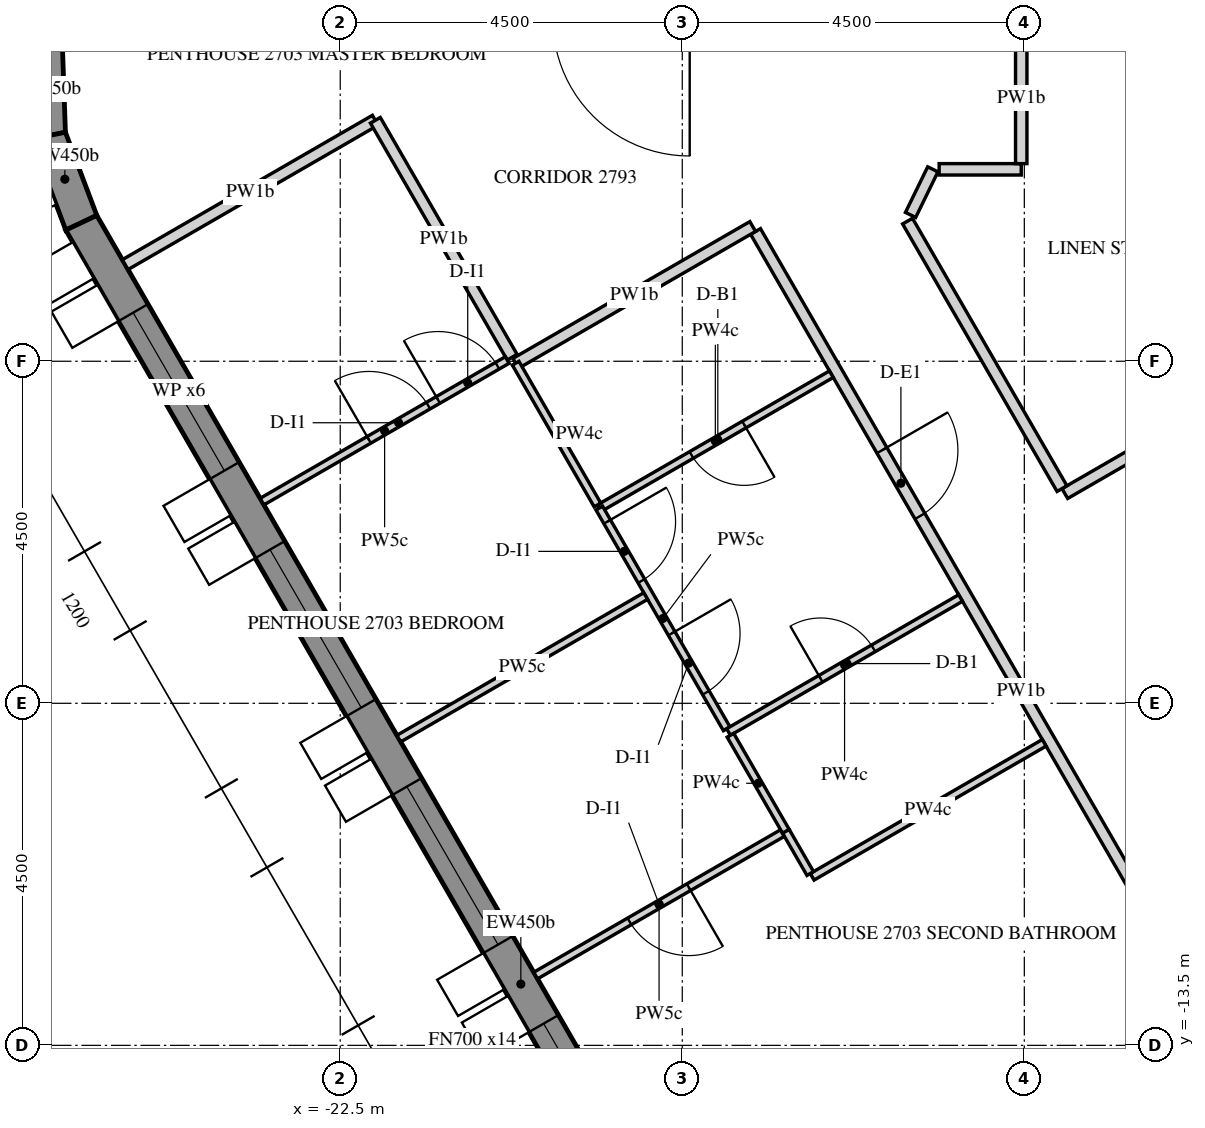
"""IFC4 building model, lengths in metres.
Left out: names, types, materials, properties, quantities, classifications, styles, units other than length and angle.
Written with IfcOpenShell. Run it as: python <this file> out.ifc"""

import sys

from ifc_helpers import new_model, si_unit, direction, frame, frame_2d, origin, place, context, subcontext, project, spatial, polyline, rectangle, outline, extrude, element, fill, save


model = new_model("IFC4")
c1 = context("Model", 3, precision=1e-05, world=origin(), true_north=direction((0.0, 1.0)))
c2 = subcontext(c1, "Body", "Model", "MODEL_VIEW")
j1 = project(units=[si_unit("LENGTHUNIT", "METRE"), si_unit("PLANEANGLEUNIT", "RADIAN")], contexts=[c1])
p1 = place(None, origin())
s1 = spatial("IfcSite", under=j1, at=p1, CompositionType="ELEMENT")
p2 = place(p1, origin())
s2 = spatial("IfcBuilding", under=s1, at=p2, CompositionType="ELEMENT")
p3 = place(p2, frame((0.0, 0.0, 349.5)))
s3 = spatial("IfcBuildingStorey", under=s2, at=p3, CompositionType="ELEMENT", Elevation=349.5)
p4 = place(p3, frame((-26.382, -0.309, 0.0), z_axis=(0.0, 0.0, 1.0), x_axis=(0.034887984255, -0.999391228976, 0.0)))
e1 = element("IfcWall", 1, at=p4, inside=s3, PredefinedType="SOLIDWALL", context=c2, shape_type="SweptSolid", body=[
    extrude(outline(polyline([(-0.037, -0.225), (1.261, -0.225), (1.188, 0.225), (0.037, 0.225), (-0.037, -0.225)])), origin(), (0.0, 0.0, 1.0), 3.75),
])
p5 = place(p3, frame((-26.339, -1.532, 0.0), z_axis=(0.0, 0.0, 1.0), x_axis=(0.353132996235, -0.935573132882, 0.0)))
e2 = element("IfcWall", 2, at=p5, inside=s3, PredefinedType="SOLIDWALL", context=c2, shape_type="SweptSolid", body=[
    extrude(outline(polyline([(-0.037, -0.225), (1.243, -0.225), (1.206, 0.225), (0.037, 0.225), (-0.037, -0.225)])), origin(), (0.0, 0.0, 1.0), 3.75),
])
p6 = place(p3, frame((-25.907, -2.678, 0.0), z_axis=(0.0, 0.0, 1.0), x_axis=(0.499997453958, -0.866026873738, 0.0)))
e3 = element("IfcWall", 3, at=p6, inside=s3, PredefinedType="SOLIDWALL", context=c2, shape_type="SweptSolid", body=[
    extrude(outline(polyline([(-0.018, -0.225), (23.152, -0.225), (23.11, 0.225), (0.018, 0.225), (-0.018, -0.225)])), origin(), (0.0, 0.0, 1.0), 3.75),
])
p7 = place(p6, frame((1.366, 0.0, 0.3)))
e4 = element("IfcOpeningElement", 4, at=p7, cuts=e3, PredefinedType="OPENING", context=c2, shape_type="SweptSolid", body=[
    extrude(rectangle(XDim=2.4, YDim=3.0, at=frame_2d((1.2, 1.5))), frame((0.0, 0.235, 0.0), z_axis=(0.0, -1.0, 0.0), x_axis=(1.0, 0.0, 0.0)), (0.0, 0.0, 1.0), 0.47),
])
p8 = place(p6, frame((4.966, 0.0, 0.3)))
e5 = element("IfcOpeningElement", 5, at=p8, cuts=e3, PredefinedType="OPENING", context=c2, shape_type="SweptSolid", body=[
    extrude(rectangle(XDim=2.4, YDim=3.0, at=frame_2d((1.2, 1.5))), frame((0.0, 0.235, 0.0), z_axis=(0.0, -1.0, 0.0), x_axis=(1.0, 0.0, 0.0)), (0.0, 0.0, 1.0), 0.47),
])
p9 = place(p6, frame((8.566, 0.0, 0.3)))
e6 = element("IfcOpeningElement", 6, at=p9, cuts=e3, PredefinedType="OPENING", context=c2, shape_type="SweptSolid", body=[
    extrude(rectangle(XDim=2.4, YDim=3.0, at=frame_2d((1.2, 1.5))), frame((0.0, 0.235, 0.0), z_axis=(0.0, -1.0, 0.0), x_axis=(1.0, 0.0, 0.0)), (0.0, 0.0, 1.0), 0.47),
])
p10 = place(p6, frame((12.166, 0.0, 0.3)))
e7 = element("IfcOpeningElement", 7, at=p10, cuts=e3, PredefinedType="OPENING", context=c2, shape_type="SweptSolid", body=[
    extrude(rectangle(XDim=2.4, YDim=3.0, at=frame_2d((1.2, 1.5))), frame((0.0, 0.235, 0.0), z_axis=(0.0, -1.0, 0.0), x_axis=(1.0, 0.0, 0.0)), (0.0, 0.0, 1.0), 0.47),
])
p11 = place(p6, frame((15.766, 0.0, 0.3)))
e8 = element("IfcOpeningElement", 8, at=p11, cuts=e3, PredefinedType="OPENING", context=c2, shape_type="SweptSolid", body=[
    extrude(rectangle(XDim=2.4, YDim=3.0, at=frame_2d((1.2, 1.5))), frame((0.0, 0.235, 0.0), z_axis=(0.0, -1.0, 0.0), x_axis=(1.0, 0.0, 0.0)), (0.0, 0.0, 1.0), 0.47),
])
p12 = place(p6, frame((19.366, 0.0, 0.3)))
e9 = element("IfcOpeningElement", 9, at=p12, cuts=e3, PredefinedType="OPENING", context=c2, shape_type="SweptSolid", body=[
    extrude(rectangle(XDim=2.4, YDim=3.0, at=frame_2d((1.2, 1.5))), frame((0.0, 0.235, 0.0), z_axis=(0.0, -1.0, 0.0), x_axis=(1.0, 0.0, 0.0)), (0.0, 0.0, 1.0), 0.47),
])
p13 = place(p3, frame((-17.036, -2.792, 0.0), z_axis=(0.0, 0.0, 1.0), x_axis=(0.500006428338, -0.86602169235, 0.0)))
e10 = element("IfcWall", 10, at=p13, inside=s3, PredefinedType="PARTITIONING", context=c2, shape_type="SweptSolid", body=[
    extrude(rectangle(XDim=13.966, YDim=0.15, at=frame_2d((6.983, 0.0))), origin(), (0.0, 0.0, 1.0), 2.82),
])
p14 = place(p13, frame((3.325, 0.0, 0.0)))
e11 = element("IfcOpeningElement", 11, at=p14, cuts=e10, PredefinedType="OPENING", context=c2, shape_type="SweptSolid", body=[
    extrude(rectangle(XDim=1.0, YDim=2.1, at=frame_2d((0.5, 1.05))), frame((0.0, 0.085, 0.0), z_axis=(0.0, -1.0, 0.0), x_axis=(1.0, 0.0, 0.0)), (0.0, 0.0, 1.0), 0.17),
])
p15 = place(p3, frame((-20.191, -4.528, 0.0), z_axis=(0.0, 0.0, 1.0), x_axis=(0.866018442252, 0.500012057535, 0.0)))
e12 = element("IfcWall", 12, at=p15, inside=s3, PredefinedType="PARTITIONING", context=c2, shape_type="SweptSolid", body=[
    extrude(rectangle(XDim=3.6, YDim=0.15, at=frame_2d((1.8, 0.0))), origin(), (0.0, 0.0, 1.0), 2.82),
])
p16 = place(p3, frame((-25.329, -3.229, 0.0), z_axis=(0.0, 0.0, 1.0), x_axis=(0.866019695343, 0.500009887181, 0.0)))
e13 = element("IfcWall", 13, at=p16, inside=s3, PredefinedType="PARTITIONING", context=c2, shape_type="SweptSolid", body=[
    extrude(rectangle(XDim=3.799, YDim=0.15, at=frame_2d((1.899, 0.0))), origin(), (0.0, 0.0, 1.0), 2.82),
])
p17 = place(p3, frame((-22.038, -1.33, 0.0), z_axis=(0.0, 0.0, 1.0), x_axis=(0.499976924066, -0.866038726271, 0.0)))
e14 = element("IfcWall", 14, at=p17, inside=s3, PredefinedType="PARTITIONING", context=c2, shape_type="SweptSolid", body=[
    extrude(rectangle(XDim=3.599, YDim=0.15, at=frame_2d((1.799, 0.0))), origin(), (0.0, 0.0, 1.0), 2.82),
])
p18 = place(p3, frame((-9.2, -4.066, 0.0), z_axis=(0.0, 0.0, 1.0), x_axis=(-0.866013608182, -0.500020430026, 0.0)))
e15 = element("IfcWall", 15, at=p18, inside=s3, PredefinedType="PARTITIONING", context=c2, shape_type="SweptSolid", body=[
    extrude(rectangle(XDim=4.35, YDim=0.15, at=frame_2d((2.175, 0.0))), origin(), (0.0, 0.0, 1.0), 2.82),
])
p19 = place(p18, frame((1.725, 0.0, 0.0)))
e16 = element("IfcOpeningElement", 16, at=p19, cuts=e15, PredefinedType="OPENING", context=c2, shape_type="SweptSolid", body=[
    extrude(rectangle(XDim=0.9, YDim=2.1, at=frame_2d((0.45, 1.05))), frame((0.0, 0.085, 0.0), z_axis=(0.0, -1.0, 0.0), x_axis=(1.0, 0.0, 0.0)), (0.0, 0.0, 1.0), 0.17),
])
p20 = place(p3, frame((-13.004, -6.176, 0.0), z_axis=(0.0, 0.0, 1.0), x_axis=(-0.500022342669, 0.866012503854, 0.0)))
e17 = element("IfcWall", 17, at=p20, inside=s3, PredefinedType="PARTITIONING", context=c2, shape_type="SweptSolid", body=[
    extrude(rectangle(XDim=4.064, YDim=0.15, at=frame_2d((2.032, 0.0))), origin(), (0.0, 0.0, 1.0), 2.82),
])
p21 = place(p3, frame((-14.997, -2.575, 0.0), z_axis=(0.0, 0.0, 1.0), x_axis=(0.438416427913, 0.898771959808, 0.0)))
e18 = element("IfcWall", 18, at=p21, inside=s3, PredefinedType="PARTITIONING", context=c2, shape_type="SweptSolid", body=[
    extrude(rectangle(XDim=0.668, YDim=0.15, at=frame_2d((0.334, 0.0))), origin(), (0.0, 0.0, 1.0), 2.82),
])
p22 = place(p3, frame((-14.62, -1.975, 0.0), z_axis=(0.0, 0.0, 1.0), x_axis=(1.0, 0.0, 0.0)))
e19 = element("IfcWall", 19, at=p22, inside=s3, PredefinedType="PARTITIONING", context=c2, shape_type="SweptSolid", body=[
    extrude(rectangle(XDim=1.08, YDim=0.15, at=frame_2d((0.54, 0.0))), origin(), (0.0, 0.0, 1.0), 2.82),
])
p23 = place(p3, frame((-13.541, -1.9, 0.0), z_axis=(0.0, 0.0, 1.0), x_axis=(0.0, 1.0, 0.0)))
e20 = element("IfcWall", 20, at=p23, inside=s3, PredefinedType="PARTITIONING", context=c2, shape_type="SweptSolid", body=[
    extrude(rectangle(XDim=1.725, YDim=0.15, at=frame_2d((0.862, 0.0))), origin(), (0.0, 0.0, 1.0), 2.82),
])
p24 = place(p3, frame((-16.681, -10.707, 0.0), z_axis=(0.0, 0.0, 1.0), x_axis=(-0.866039234136, -0.499976044363, 0.0)))
e21 = element("IfcWall", 21, at=p24, inside=s3, PredefinedType="PARTITIONING", context=c2, shape_type="SweptSolid", body=[
    extrude(rectangle(XDim=3.75, YDim=0.1, at=frame_2d((1.875, 0.0))), origin(), (0.0, 0.0, 1.0), 2.82),
])
p25 = place(p24, frame((1.425, 0.0, 0.0)))
e22 = element("IfcOpeningElement", 22, at=p25, cuts=e21, PredefinedType="OPENING", context=c2, shape_type="SweptSolid", body=[
    extrude(rectangle(XDim=0.9, YDim=2.1, at=frame_2d((0.45, 1.05))), frame((0.0, 0.06, 0.0), z_axis=(0.0, -1.0, 0.0), x_axis=(1.0, 0.0, 0.0)), (0.0, 0.0, 1.0), 0.12),
])
p26 = place(p3, frame((-13.239, -9.52, 0.0), z_axis=(0.0, 0.0, 1.0), x_axis=(-0.866031034943, -0.499990246421, 0.0)))
e23 = element("IfcWall", 23, at=p26, inside=s3, PredefinedType="PARTITIONING", context=c2, shape_type="SweptSolid", body=[
    extrude(rectangle(XDim=3.525, YDim=0.1, at=frame_2d((1.762, 0.0))), origin(), (0.0, 0.0, 1.0), 2.82),
])
p27 = place(p3, frame((-16.316, -11.239, 0.0), z_axis=(0.0, 0.0, 1.0), x_axis=(-0.499962526042, 0.866047038303, 0.0)))
e24 = element("IfcWall", 24, at=p27, inside=s3, PredefinedType="PARTITIONING", context=c2, shape_type="SweptSolid", body=[
    extrude(rectangle(XDim=0.646, YDim=0.1, at=frame_2d((0.323, 0.0))), origin(), (0.0, 0.0, 1.0), 2.82),
])
p28 = place(p3, frame((-16.039, -4.67, 0.0), z_axis=(0.0, 0.0, 1.0), x_axis=(-0.866031034943, -0.499990246421, 0.0)))
e25 = element("IfcWall", 25, at=p28, inside=s3, PredefinedType="PARTITIONING", context=c2, shape_type="SweptSolid", body=[
    extrude(rectangle(XDim=3.525, YDim=0.1, at=frame_2d((1.762, 0.0))), origin(), (0.0, 0.0, 1.0), 2.82),
])
p29 = place(p28, frame((1.325, 0.0, 0.0)))
e26 = element("IfcOpeningElement", 26, at=p29, cuts=e25, PredefinedType="OPENING", context=c2, shape_type="SweptSolid", body=[
    extrude(rectangle(XDim=0.8, YDim=2.1, at=frame_2d((0.4, 1.05))), frame((0.0, 0.06, 0.0), z_axis=(0.0, -1.0, 0.0), x_axis=(1.0, 0.0, 0.0)), (0.0, 0.0, 1.0), 0.12),
])
p30 = place(p3, frame((-19.092, -6.431, 0.0), z_axis=(0.0, 0.0, 1.0), x_axis=(0.500014404596, -0.866017087127, 0.0)))
e27 = element("IfcWall", 27, at=p30, inside=s3, PredefinedType="PARTITIONING", context=c2, shape_type="SweptSolid", body=[
    extrude(rectangle(XDim=3.354, YDim=0.1, at=frame_2d((1.677, 0.0))), origin(), (0.0, 0.0, 1.0), 2.82),
])
p31 = place(p30, frame((0.208, 0.0, 0.0)))
e28 = element("IfcOpeningElement", 28, at=p31, cuts=e27, PredefinedType="OPENING", context=c2, shape_type="SweptSolid", body=[
    extrude(rectangle(XDim=0.9, YDim=2.1, at=frame_2d((0.45, 1.05))), frame((0.0, 0.06, 0.0), z_axis=(0.0, -1.0, 0.0), x_axis=(1.0, 0.0, 0.0)), (0.0, 0.0, 1.0), 0.12),
])
p32 = place(p30, frame((1.905, 0.0, 0.0)))
e29 = element("IfcOpeningElement", 29, at=p32, cuts=e27, PredefinedType="OPENING", context=c2, shape_type="SweptSolid", body=[
    extrude(rectangle(XDim=0.9, YDim=2.1, at=frame_2d((0.45, 1.05))), frame((0.0, 0.06, 0.0), z_axis=(0.0, -1.0, 0.0), x_axis=(1.0, 0.0, 0.0)), (0.0, 0.0, 1.0), 0.12),
])
p33 = place(p3, frame((-17.391, -9.377, 0.0), z_axis=(0.0, 0.0, 1.0), x_axis=(0.866001044215, 0.500042189638, 0.0)))
e30 = element("IfcWall", 30, at=p33, inside=s3, PredefinedType="PARTITIONING", context=c2, shape_type="SweptSolid", body=[
    extrude(rectangle(XDim=3.525, YDim=0.1, at=frame_2d((1.763, 0.0))), origin(), (0.0, 0.0, 1.0), 2.82),
])
p34 = place(p33, frame((1.4, 0.0, 0.0)))
e31 = element("IfcOpeningElement", 31, at=p34, cuts=e30, PredefinedType="OPENING", context=c2, shape_type="SweptSolid", body=[
    extrude(rectangle(XDim=0.8, YDim=2.1, at=frame_2d((0.4, 1.05))), frame((0.0, 0.06, 0.0), z_axis=(0.0, -1.0, 0.0), x_axis=(1.0, 0.0, 0.0)), (0.0, 0.0, 1.0), 0.12),
])
p35 = place(p3, frame((-20.192, -4.526, 0.0), z_axis=(0.0, 0.0, 1.0), x_axis=(0.500039660922, -0.86600250433, 0.0)))
e32 = element("IfcWall", 32, at=p35, inside=s3, PredefinedType="PARTITIONING", context=c2, shape_type="SweptSolid", body=[
    extrude(rectangle(XDim=2.154, YDim=0.1, at=frame_2d((1.077, 0.0))), origin(), (0.0, 0.0, 1.0), 2.82),
])
p36 = place(p3, frame((-23.529, -6.346, 0.0), z_axis=(0.0, 0.0, 1.0), x_axis=(0.866012039196, 0.500023147432, 0.0)))
e33 = element("IfcWall", 33, at=p36, inside=s3, PredefinedType="PARTITIONING", context=c2, shape_type="SweptSolid", body=[
    extrude(rectangle(XDim=3.725, YDim=0.1, at=frame_2d((1.862, 0.0))), origin(), (0.0, 0.0, 1.0), 2.82),
])
p37 = place(p36, frame((2.675, 0.0, 0.0)))
e34 = element("IfcOpeningElement", 34, at=p37, cuts=e33, PredefinedType="OPENING", context=c2, shape_type="SweptSolid", body=[
    extrude(rectangle(XDim=0.9, YDim=2.1, at=frame_2d((0.45, 1.05))), frame((0.0, 0.06, 0.0), z_axis=(0.0, -1.0, 0.0), x_axis=(1.0, 0.0, 0.0)), (0.0, 0.0, 1.0), 0.12),
])
p38 = place(p36, frame((1.625, 0.0, 0.0)))
e35 = element("IfcOpeningElement", 35, at=p38, cuts=e33, PredefinedType="OPENING", context=c2, shape_type="SweptSolid", body=[
    extrude(rectangle(XDim=0.9, YDim=2.1, at=frame_2d((0.45, 1.05))), frame((0.0, 0.06, 0.0), z_axis=(0.0, -1.0, 0.0), x_axis=(1.0, 0.0, 0.0)), (0.0, 0.0, 1.0), 0.12),
])
p39 = place(p3, frame((-21.729, -9.464, 0.0), z_axis=(0.0, 0.0, 1.0), x_axis=(0.866022959057, 0.500004234368, 0.0)))
e36 = element("IfcWall", 36, at=p39, inside=s3, PredefinedType="PARTITIONING", context=c2, shape_type="SweptSolid", body=[
    extrude(rectangle(XDim=3.75, YDim=0.1, at=frame_2d((1.875, 0.0))), origin(), (0.0, 0.0, 1.0), 2.82),
])
p40 = place(p3, frame((-16.637, -10.684, 0.0), z_axis=(0.0, 0.0, 1.0), x_axis=(-0.500046085413, 0.865998794724, 0.0)))
e37 = element("IfcWall", 37, at=p40, inside=s3, PredefinedType="PARTITIONING", context=c2, shape_type="SweptSolid", body=[
    extrude(rectangle(XDim=1.458, YDim=0.1, at=frame_2d((0.729, 0.0))), origin(), (0.0, 0.0, 1.0), 2.82),
])
p41 = place(p7, frame((0.0, 0.155, 0.0)))
e38 = element("IfcWindow", 38, at=p41, inside=s3, PartitioningType="DOUBLE_PANEL_VERTICAL", PredefinedType="WINDOW", context=c2, shape_type="SweptSolid", body=[
    extrude(rectangle(XDim=2.4, YDim=3.0, at=frame_2d((1.2, 1.5))), frame((0.0, 0.03, 0.0), z_axis=(0.0, -1.0, 0.0), x_axis=(1.0, 0.0, 0.0)), (0.0, 0.0, 1.0), 0.06),
])
fill(e4, e38)
p42 = place(p8, frame((0.0, 0.155, 0.0)))
e39 = element("IfcWindow", 39, at=p42, inside=s3, PartitioningType="DOUBLE_PANEL_VERTICAL", PredefinedType="WINDOW", context=c2, shape_type="SweptSolid", body=[
    extrude(rectangle(XDim=2.4, YDim=3.0, at=frame_2d((1.2, 1.5))), frame((0.0, 0.03, 0.0), z_axis=(0.0, -1.0, 0.0), x_axis=(1.0, 0.0, 0.0)), (0.0, 0.0, 1.0), 0.06),
])
fill(e5, e39)
p43 = place(p9, frame((0.0, 0.155, 0.0)))
e40 = element("IfcWindow", 40, at=p43, inside=s3, PartitioningType="DOUBLE_PANEL_VERTICAL", PredefinedType="WINDOW", context=c2, shape_type="SweptSolid", body=[
    extrude(rectangle(XDim=2.4, YDim=3.0, at=frame_2d((1.2, 1.5))), frame((0.0, 0.03, 0.0), z_axis=(0.0, -1.0, 0.0), x_axis=(1.0, 0.0, 0.0)), (0.0, 0.0, 1.0), 0.06),
])
fill(e6, e40)
p44 = place(p10, frame((0.0, 0.155, 0.0)))
e41 = element("IfcWindow", 41, at=p44, inside=s3, PartitioningType="DOUBLE_PANEL_VERTICAL", PredefinedType="WINDOW", context=c2, shape_type="SweptSolid", body=[
    extrude(rectangle(XDim=2.4, YDim=3.0, at=frame_2d((1.2, 1.5))), frame((0.0, 0.03, 0.0), z_axis=(0.0, -1.0, 0.0), x_axis=(1.0, 0.0, 0.0)), (0.0, 0.0, 1.0), 0.06),
])
fill(e7, e41)
p45 = place(p14, origin())
e42 = element("IfcDoor", 42, at=p45, inside=s3, OperationType="SINGLE_SWING_RIGHT", PredefinedType="DOOR", context=c2, shape_type="SweptSolid", body=[
    extrude(rectangle(XDim=1.0, YDim=2.1, at=frame_2d((0.5, 1.05))), frame((0.0, 0.025, 0.0), z_axis=(0.0, -1.0, 0.0), x_axis=(1.0, 0.0, 0.0)), (0.0, 0.0, 1.0), 0.05),
])
fill(e11, e42)
p46 = place(p29, origin())
e43 = element("IfcDoor", 43, at=p46, inside=s3, OperationType="SINGLE_SWING_RIGHT", PredefinedType="DOOR", context=c2, shape_type="SweptSolid", body=[
    extrude(rectangle(XDim=0.8, YDim=2.1, at=frame_2d((0.4, 1.05))), frame((0.0, 0.025, 0.0), z_axis=(0.0, -1.0, 0.0), x_axis=(1.0, 0.0, 0.0)), (0.0, 0.0, 1.0), 0.05),
])
fill(e26, e43)
p47 = place(p31, origin())
e44 = element("IfcDoor", 44, at=p47, inside=s3, OperationType="SINGLE_SWING_LEFT", PredefinedType="DOOR", context=c2, shape_type="SweptSolid", body=[
    extrude(rectangle(XDim=0.9, YDim=2.1, at=frame_2d((0.45, 1.05))), frame((0.0, 0.025, 0.0), z_axis=(0.0, -1.0, 0.0), x_axis=(1.0, 0.0, 0.0)), (0.0, 0.0, 1.0), 0.05),
])
fill(e28, e44)
p48 = place(p37, origin())
e45 = element("IfcDoor", 45, at=p48, inside=s3, OperationType="SINGLE_SWING_RIGHT", PredefinedType="DOOR", context=c2, shape_type="SweptSolid", body=[
    extrude(rectangle(XDim=0.9, YDim=2.1, at=frame_2d((0.45, 1.05))), frame((0.0, 0.025, 0.0), z_axis=(0.0, -1.0, 0.0), x_axis=(1.0, 0.0, 0.0)), (0.0, 0.0, 1.0), 0.05),
])
fill(e34, e45)
p49 = place(p38, origin())
e46 = element("IfcDoor", 46, at=p49, inside=s3, OperationType="SINGLE_SWING_LEFT", PredefinedType="DOOR", context=c2, shape_type="SweptSolid", body=[
    extrude(rectangle(XDim=0.9, YDim=2.1, at=frame_2d((0.45, 1.05))), frame((0.0, 0.025, 0.0), z_axis=(0.0, -1.0, 0.0), x_axis=(1.0, 0.0, 0.0)), (0.0, 0.0, 1.0), 0.05),
])
fill(e35, e46)
p50 = place(p32, origin())
e47 = element("IfcDoor", 47, at=p50, inside=s3, OperationType="SINGLE_SWING_LEFT", PredefinedType="DOOR", context=c2, shape_type="SweptSolid", body=[
    extrude(rectangle(XDim=0.9, YDim=2.1, at=frame_2d((0.45, 1.05))), frame((0.0, 0.025, 0.0), z_axis=(0.0, -1.0, 0.0), x_axis=(1.0, 0.0, 0.0)), (0.0, 0.0, 1.0), 0.05),
])
fill(e29, e47)
p51 = place(p34, origin())
e48 = element("IfcDoor", 48, at=p51, inside=s3, OperationType="SINGLE_SWING_LEFT", PredefinedType="DOOR", context=c2, shape_type="SweptSolid", body=[
    extrude(rectangle(XDim=0.8, YDim=2.1, at=frame_2d((0.4, 1.05))), frame((0.0, 0.025, 0.0), z_axis=(0.0, -1.0, 0.0), x_axis=(1.0, 0.0, 0.0)), (0.0, 0.0, 1.0), 0.05),
])
fill(e31, e48)
p52 = place(p25, origin())
e49 = element("IfcDoor", 49, at=p52, inside=s3, OperationType="SINGLE_SWING_RIGHT", PredefinedType="DOOR", context=c2, shape_type="SweptSolid", body=[
    extrude(rectangle(XDim=0.9, YDim=2.1, at=frame_2d((0.45, 1.05))), frame((0.0, 0.025, 0.0), z_axis=(0.0, -1.0, 0.0), x_axis=(1.0, 0.0, 0.0)), (0.0, 0.0, 1.0), 0.05),
])
fill(e22, e49)
save(model, sys.argv[1])
